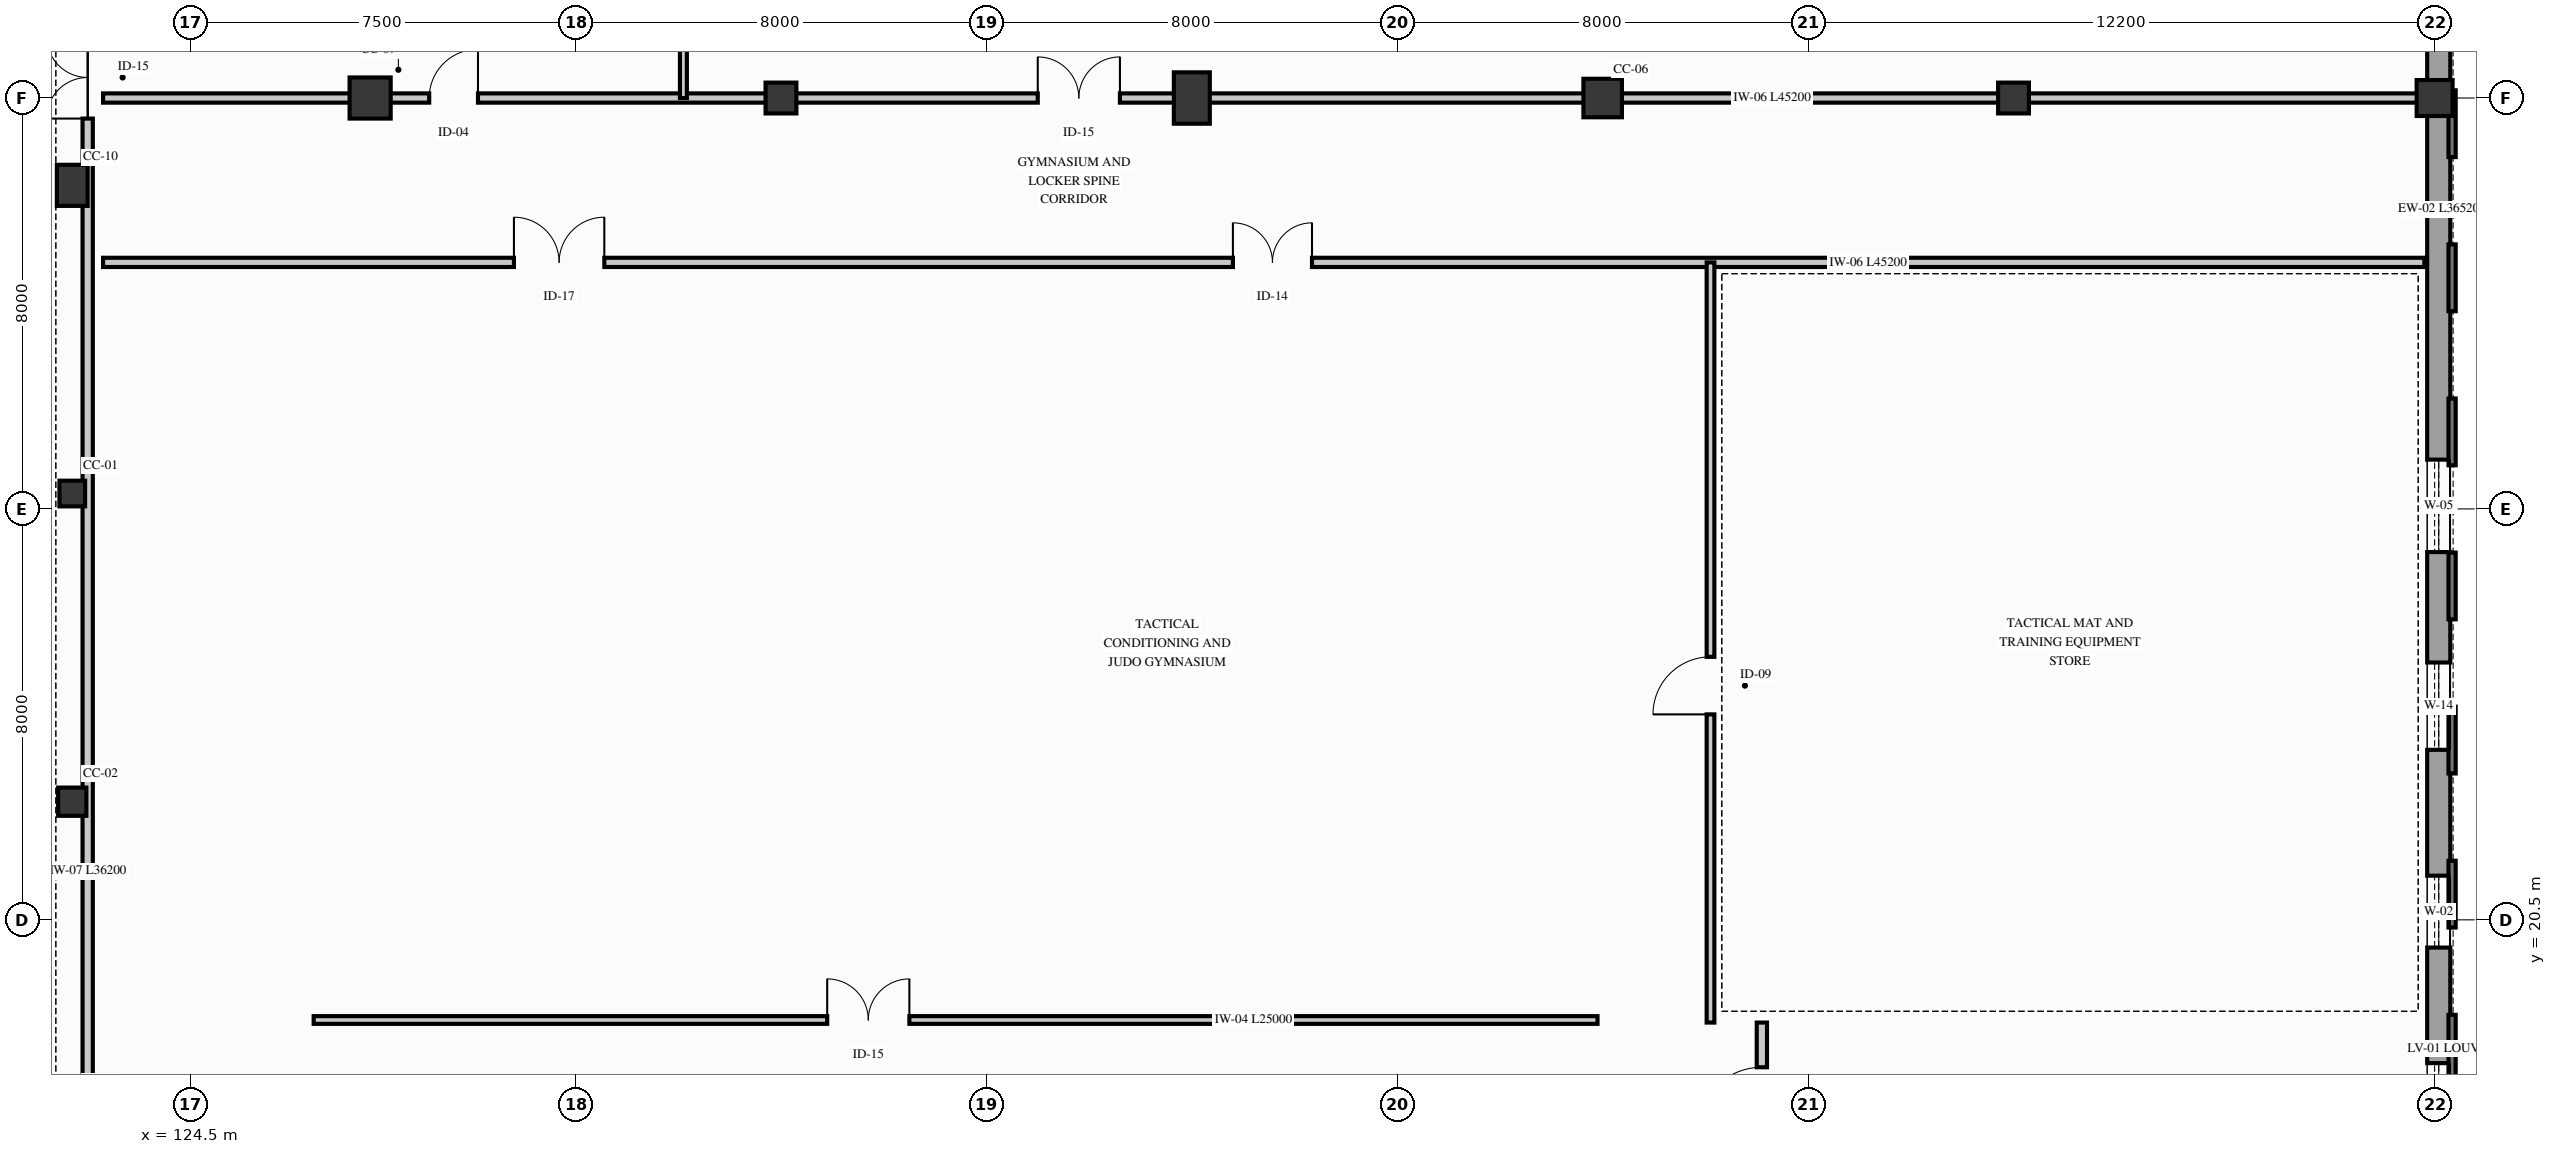
"""IFC4 building model, lengths in metres.
Left out: names, types, materials, properties, quantities, classifications, styles, units other than length and angle.
Written with IfcOpenShell. Run it as: python <this file> out.ifc"""

import sys

from ifc_helpers import new_model, si_unit, direction, frame, frame_2d, origin, origin_2d, place, context, subcontext, project, spatial, rectangle, circle, extrude, element, fill, save


model = new_model("IFC4")
c1 = context("Model", 3, precision=1e-05, world=origin(), true_north=direction((0.0, 1.0)))
c2 = subcontext(c1, "Body", "Model", "MODEL_VIEW")
j1 = project(units=[si_unit("LENGTHUNIT", "METRE"), si_unit("PLANEANGLEUNIT", "RADIAN")], contexts=[c1])
p1 = place(None, origin())
s1 = spatial("IfcSite", under=j1, at=p1, CompositionType="ELEMENT")
p2 = place(p1, origin())
s2 = spatial("IfcBuilding", under=s1, at=p2, CompositionType="ELEMENT")
p3 = place(p2, origin())
s3 = spatial("IfcBuildingStorey", under=s2, at=p3, CompositionType="ELEMENT", Elevation=0.0)
p4 = place(p3, frame((122.2, 22.8, 0.0), z_axis=(0.0, 0.0, 1.0), x_axis=(1.0, 0.0, 0.0)))
e1 = element("IfcColumn", 1, at=p4, inside=s3, PredefinedType="COLUMN", context=c2, shape_type="SweptSolid", body=[
    extrude(rectangle(XDim=0.55, YDim=0.55, at=origin_2d()), origin(), (0.0, 0.0, 1.0), 5.1),
])
p5 = place(p3, frame((122.2, 28.8, 0.0), z_axis=(0.0, 0.0, 1.0), x_axis=(1.0, 0.0, 0.0)))
e2 = element("IfcColumn", 2, at=p5, inside=s3, PredefinedType="COLUMN", context=c2, shape_type="SweptSolid", body=[
    extrude(rectangle(XDim=0.5, YDim=0.5, at=origin_2d()), origin(), (0.0, 0.0, 1.0), 5.1),
])
p6 = place(p3, frame((122.2, 34.8, 0.0), z_axis=(0.0, 0.0, 1.0), x_axis=(1.0, 0.0, 0.0)))
e3 = element("IfcColumn", 3, at=p6, inside=s3, PredefinedType="COLUMN", context=c2, shape_type="SweptSolid", body=[
    extrude(rectangle(XDim=0.6, YDim=0.8, at=origin_2d()), origin(), (0.0, 0.0, 1.0), 5.1),
])
p7 = place(p3, frame((128.0, 36.5, 0.0), z_axis=(0.0, 0.0, 1.0), x_axis=(1.0, 0.0, 0.0)))
e4 = element("IfcColumn", 4, at=p7, inside=s3, PredefinedType="COLUMN", context=c2, shape_type="SweptSolid", body=[
    extrude(rectangle(XDim=0.8, YDim=0.8, at=origin_2d()), origin(), (0.0, 0.0, 1.0), 5.1),
])
p8 = place(p3, frame((136.0, 36.5, 0.0), z_axis=(0.0, 0.0, 1.0), x_axis=(1.0, 0.0, 0.0)))
e5 = element("IfcColumn", 5, at=p8, inside=s3, PredefinedType="COLUMN", context=c2, shape_type="SweptSolid", body=[
    extrude(rectangle(XDim=0.6, YDim=0.6, at=origin_2d()), origin(), (0.0, 0.0, 1.0), 5.1),
])
p9 = place(p3, frame((144.0, 36.5, 0.0), z_axis=(0.0, 0.0, 1.0), x_axis=(1.0, 0.0, 0.0)))
e6 = element("IfcColumn", 6, at=p9, inside=s3, PredefinedType="COLUMN", context=c2, shape_type="SweptSolid", body=[
    extrude(rectangle(XDim=0.7, YDim=1.0, at=origin_2d()), origin(), (0.0, 0.0, 1.0), 5.1),
])
p10 = place(p3, frame((152.0, 36.5, 0.0), z_axis=(0.0, 0.0, 1.0), x_axis=(1.0, 0.0, 0.0)))
e7 = element("IfcColumn", 7, at=p10, inside=s3, PredefinedType="COLUMN", context=c2, shape_type="SweptSolid", body=[
    extrude(rectangle(XDim=0.75, YDim=0.75, at=origin_2d()), origin(), (0.0, 0.0, 1.0), 5.1),
])
p11 = place(p3, frame((160.0, 36.5, 0.0), z_axis=(0.0, 0.0, 1.0), x_axis=(1.0, 0.0, 0.0)))
e8 = element("IfcColumn", 8, at=p11, inside=s3, PredefinedType="COLUMN", context=c2, shape_type="SweptSolid", body=[
    extrude(rectangle(XDim=0.6, YDim=0.6, at=origin_2d()), origin(), (0.0, 0.0, 1.0), 5.1),
])
p12 = place(p3, frame((168.2, 36.5, 0.0), z_axis=(0.0, 0.0, 1.0), x_axis=(1.0, 0.0, 0.0)))
e9 = element("IfcColumn", 9, at=p12, inside=s3, PredefinedType="COLUMN", context=c2, shape_type="SweptSolid", body=[
    extrude(circle(Radius=0.35, at=origin_2d()), origin(), (0.0, 0.0, 1.0), 5.1),
])
p13 = place(p3, frame((168.28, 6.76, 0.0), z_axis=(0.0, 0.0, 1.0), x_axis=(0.0, 1.0, 0.0)))
e10 = element("IfcWall", 10, at=p13, inside=s3, PredefinedType="SOLIDWALL", context=c2, shape_type="SweptSolid", body=[
    extrude(rectangle(XDim=36.52, YDim=0.45, at=frame_2d((18.26, 0.0))), origin(), (0.0, 0.0, 1.0), 4.56),
])
p14 = place(p13, frame((1.65, 0.0, 0.85)))
e11 = element("IfcOpeningElement", 11, at=p14, cuts=e10, PredefinedType="OPENING", context=c2, shape_type="SweptSolid", body=[
    extrude(rectangle(XDim=1.3, YDim=2.15, at=frame_2d((0.65, 1.075))), frame((0.0, 0.235, 0.0), z_axis=(0.0, -1.0, 0.0), x_axis=(1.0, 0.0, 0.0)), (0.0, 0.0, 1.0), 0.47),
])
p15 = place(p13, frame((5.5, 0.0, 0.85)))
e12 = element("IfcOpeningElement", 12, at=p15, cuts=e10, PredefinedType="OPENING", context=c2, shape_type="SweptSolid", body=[
    extrude(rectangle(XDim=1.5, YDim=2.3, at=frame_2d((0.75, 1.15))), frame((0.0, 0.235, 0.0), z_axis=(0.0, -1.0, 0.0), x_axis=(1.0, 0.0, 0.0)), (0.0, 0.0, 1.0), 0.47),
])
p16 = place(p13, frame((9.35, 0.0, 0.85)))
e13 = element("IfcOpeningElement", 13, at=p16, cuts=e10, PredefinedType="OPENING", context=c2, shape_type="SweptSolid", body=[
    extrude(rectangle(XDim=1.6, YDim=2.4, at=frame_2d((0.8, 1.2))), frame((0.0, 0.235, 0.0), z_axis=(0.0, -1.0, 0.0), x_axis=(1.0, 0.0, 0.0)), (0.0, 0.0, 1.0), 0.47),
])
p17 = place(p13, frame((13.2, 0.0, 0.85)))
e14 = element("IfcOpeningElement", 14, at=p17, cuts=e10, PredefinedType="OPENING", context=c2, shape_type="SweptSolid", body=[
    extrude(rectangle(XDim=1.4, YDim=2.2, at=frame_2d((0.7, 1.1))), frame((0.0, 0.235, 0.0), z_axis=(0.0, -1.0, 0.0), x_axis=(1.0, 0.0, 0.0)), (0.0, 0.0, 1.0), 0.47),
])
p18 = place(p13, frame((17.05, 0.0, 0.85)))
e15 = element("IfcOpeningElement", 15, at=p18, cuts=e10, PredefinedType="OPENING", context=c2, shape_type="SweptSolid", body=[
    extrude(rectangle(XDim=1.7, YDim=2.35, at=frame_2d((0.85, 1.175))), frame((0.0, 0.235, 0.0), z_axis=(0.0, -1.0, 0.0), x_axis=(1.0, 0.0, 0.0)), (0.0, 0.0, 1.0), 0.47),
])
p19 = place(p13, frame((20.9, 0.0, 0.85)))
e16 = element("IfcOpeningElement", 16, at=p19, cuts=e10, PredefinedType="OPENING", context=c2, shape_type="SweptSolid", body=[
    extrude(rectangle(XDim=1.8, YDim=2.4, at=frame_2d((0.9, 1.2))), frame((0.0, 0.235, 0.0), z_axis=(0.0, -1.0, 0.0), x_axis=(1.0, 0.0, 0.0)), (0.0, 0.0, 1.0), 0.47),
])
p20 = place(p13, frame((32.45, 0.0, 0.85)))
e17 = element("IfcOpeningElement", 17, at=p20, cuts=e10, PredefinedType="OPENING", context=c2, shape_type="SweptSolid", body=[
    extrude(rectangle(XDim=2.0, YDim=2.5, at=frame_2d((1.0, 1.25))), frame((0.0, 0.235, 0.0), z_axis=(0.0, -1.0, 0.0), x_axis=(1.0, 0.0, 0.0)), (0.0, 0.0, 1.0), 0.47),
])
p21 = place(p3, frame((155.1, 6.78, 0.0), z_axis=(0.0, 0.0, 1.0), x_axis=(0.0, 1.0, 0.0)))
e18 = element("IfcWall", 18, at=p21, inside=s3, PredefinedType="PARTITIONING", context=c2, shape_type="SweptSolid", body=[
    extrude(rectangle(XDim=11.72, YDim=0.2, at=frame_2d((5.86, 0.0))), origin(), (0.0, 0.0, 1.0), 4.368),
])
p22 = place(p21, frame((9.6, 0.0, 0.0)))
e19 = element("IfcOpeningElement", 19, at=p22, cuts=e18, PredefinedType="OPENING", context=c2, shape_type="SweptSolid", body=[
    extrude(rectangle(XDim=1.25, YDim=2.2, at=frame_2d((0.625, 1.1))), frame((0.0, 0.11, 0.0), z_axis=(0.0, -1.0, 0.0), x_axis=(1.0, 0.0, 0.0)), (0.0, 0.0, 1.0), 0.22),
])
p23 = place(p3, frame((122.5, 6.8, 0.0), z_axis=(0.0, 0.0, 1.0), x_axis=(0.0, 1.0, 0.0)))
e20 = element("IfcWall", 20, at=p23, inside=s3, PredefinedType="PARTITIONING", context=c2, shape_type="SweptSolid", body=[
    extrude(rectangle(XDim=36.2, YDim=0.2, at=frame_2d((18.1, 0.0))), origin(), (0.0, 0.0, 1.0), 4.86),
])
p24 = place(p23, frame((29.3, 0.0, 0.0)))
e21 = element("IfcOpeningElement", 21, at=p24, cuts=e20, PredefinedType="OPENING", context=c2, shape_type="SweptSolid", body=[
    extrude(rectangle(XDim=1.6, YDim=2.3, at=frame_2d((0.8, 1.15))), frame((0.0, 0.11, 0.0), z_axis=(0.0, -1.0, 0.0), x_axis=(1.0, 0.0, 0.0)), (0.0, 0.0, 1.0), 0.22),
])
p25 = place(p3, frame((122.8, 33.3, 0.0), z_axis=(0.0, 0.0, 1.0), x_axis=(1.0, 0.0, 0.0)))
e22 = element("IfcWall", 22, at=p25, inside=s3, PredefinedType="PARTITIONING", context=c2, shape_type="SweptSolid", body=[
    extrude(rectangle(XDim=45.2, YDim=0.18, at=frame_2d((22.6, 0.0))), origin(), (0.0, 0.0, 1.0), 4.328),
])
p26 = place(p25, frame((8.0, 0.0, 0.0)))
e23 = element("IfcOpeningElement", 23, at=p26, cuts=e22, PredefinedType="OPENING", context=c2, shape_type="SweptSolid", body=[
    extrude(rectangle(XDim=1.76, YDim=2.36, at=frame_2d((0.88, 1.18))), frame((0.0, 0.1, 0.0), z_axis=(0.0, -1.0, 0.0), x_axis=(1.0, 0.0, 0.0)), (0.0, 0.0, 1.0), 0.2),
])
p27 = place(p25, frame((22.0, 0.0, 0.0)))
e24 = element("IfcOpeningElement", 24, at=p27, cuts=e22, PredefinedType="OPENING", context=c2, shape_type="SweptSolid", body=[
    extrude(rectangle(XDim=1.54, YDim=2.3, at=frame_2d((0.77, 1.15))), frame((0.0, 0.1, 0.0), z_axis=(0.0, -1.0, 0.0), x_axis=(1.0, 0.0, 0.0)), (0.0, 0.0, 1.0), 0.2),
])
p28 = place(p3, frame((122.8, 36.5, 0.0), z_axis=(0.0, 0.0, 1.0), x_axis=(1.0, 0.0, 0.0)))
e25 = element("IfcWall", 25, at=p28, inside=s3, PredefinedType="PARTITIONING", context=c2, shape_type="SweptSolid", body=[
    extrude(rectangle(XDim=45.2, YDim=0.18, at=frame_2d((22.6, 0.0))), origin(), (0.0, 0.0, 1.0), 4.37),
])
p29 = place(p28, frame((6.35, 0.0, 0.0)))
e26 = element("IfcOpeningElement", 26, at=p29, cuts=e25, PredefinedType="OPENING", context=c2, shape_type="SweptSolid", body=[
    extrude(rectangle(XDim=0.95, YDim=2.15, at=frame_2d((0.475, 1.075))), frame((0.0, 0.1, 0.0), z_axis=(0.0, -1.0, 0.0), x_axis=(1.0, 0.0, 0.0)), (0.0, 0.0, 1.0), 0.2),
])
p30 = place(p28, frame((18.2, 0.0, 0.0)))
e27 = element("IfcOpeningElement", 27, at=p30, cuts=e25, PredefinedType="OPENING", context=c2, shape_type="SweptSolid", body=[
    extrude(rectangle(XDim=1.6, YDim=2.3, at=frame_2d((0.8, 1.15))), frame((0.0, 0.1, 0.0), z_axis=(0.0, -1.0, 0.0), x_axis=(1.0, 0.0, 0.0)), (0.0, 0.0, 1.0), 0.2),
])
p31 = place(p3, frame((126.9, 18.55, 0.0), z_axis=(0.0, 0.0, 1.0), x_axis=(1.0, 0.0, 0.0)))
e28 = element("IfcWall", 28, at=p31, inside=s3, PredefinedType="PARTITIONING", context=c2, shape_type="SweptSolid", body=[
    extrude(rectangle(XDim=25.0, YDim=0.15, at=frame_2d((12.5, 0.0))), origin(), (0.0, 0.0, 1.0), 4.86),
])
p32 = place(p31, frame((10.0, 0.0, 0.0)))
e29 = element("IfcOpeningElement", 29, at=p32, cuts=e28, PredefinedType="OPENING", context=c2, shape_type="SweptSolid", body=[
    extrude(rectangle(XDim=1.6, YDim=2.3, at=frame_2d((0.8, 1.15))), frame((0.0, 0.085, 0.0), z_axis=(0.0, -1.0, 0.0), x_axis=(1.0, 0.0, 0.0)), (0.0, 0.0, 1.0), 0.17),
])
p33 = place(p3, frame((134.1, 36.5, 0.0), z_axis=(0.0, 0.0, 1.0), x_axis=(0.0, 1.0, 0.0)))
e30 = element("IfcWall", 30, at=p33, inside=s3, PredefinedType="PARTITIONING", context=c2, shape_type="SweptSolid", body=[
    extrude(rectangle(XDim=6.5, YDim=0.135, at=frame_2d((3.25, 0.0))), origin(), (0.0, 0.0, 1.0), 4.86),
])
p34 = place(p3, frame((154.1, 18.5, 0.0), z_axis=(0.0, 0.0, 1.0), x_axis=(0.0, 1.0, 0.0)))
e31 = element("IfcWall", 31, at=p34, inside=s3, PredefinedType="PARTITIONING", context=c2, shape_type="SweptSolid", body=[
    extrude(rectangle(XDim=14.8, YDim=0.15, at=frame_2d((7.4, 0.0))), origin(), (0.0, 0.0, 1.0), 4.86),
])
p35 = place(p34, frame((6.0, 0.0, 0.0)))
e32 = element("IfcOpeningElement", 32, at=p35, cuts=e31, PredefinedType="OPENING", context=c2, shape_type="SweptSolid", body=[
    extrude(rectangle(XDim=1.12, YDim=2.2, at=frame_2d((0.56, 1.1))), frame((0.0, 0.085, 0.0), z_axis=(0.0, -1.0, 0.0), x_axis=(1.0, 0.0, 0.0)), (0.0, 0.0, 1.0), 0.17),
])
p36 = place(p16, origin())
e33 = element("IfcWindow", 33, at=p36, inside=s3, PartitioningType="SINGLE_PANEL", PredefinedType="WINDOW", context=c2, shape_type="SweptSolid", body=[
    extrude(rectangle(XDim=1.6, YDim=2.4, at=frame_2d((0.8, 1.2))), frame((0.0, 0.03, 0.0), z_axis=(0.0, -1.0, 0.0), x_axis=(1.0, 0.0, 0.0)), (0.0, 0.0, 1.0), 0.06),
])
fill(e13, e33)
p37 = place(p17, origin())
e34 = element("IfcWindow", 34, at=p37, inside=s3, PartitioningType="SINGLE_PANEL", PredefinedType="WINDOW", context=c2, shape_type="SweptSolid", body=[
    extrude(rectangle(XDim=1.4, YDim=2.2, at=frame_2d((0.7, 1.1))), frame((0.0, 0.03, 0.0), z_axis=(0.0, -1.0, 0.0), x_axis=(1.0, 0.0, 0.0)), (0.0, 0.0, 1.0), 0.06),
])
fill(e14, e34)
p38 = place(p18, origin())
e35 = element("IfcWindow", 35, at=p38, inside=s3, PartitioningType="SINGLE_PANEL", PredefinedType="WINDOW", context=c2, shape_type="SweptSolid", body=[
    extrude(rectangle(XDim=1.7, YDim=2.35, at=frame_2d((0.85, 1.175))), frame((0.0, 0.03, 0.0), z_axis=(0.0, -1.0, 0.0), x_axis=(1.0, 0.0, 0.0)), (0.0, 0.0, 1.0), 0.06),
])
fill(e15, e35)
p39 = place(p19, origin())
e36 = element("IfcWindow", 36, at=p39, inside=s3, PartitioningType="SINGLE_PANEL", PredefinedType="WINDOW", context=c2, shape_type="SweptSolid", body=[
    extrude(rectangle(XDim=1.8, YDim=2.4, at=frame_2d((0.9, 1.2))), frame((0.0, 0.03, 0.0), z_axis=(0.0, -1.0, 0.0), x_axis=(1.0, 0.0, 0.0)), (0.0, 0.0, 1.0), 0.06),
])
fill(e16, e36)
p40 = place(p22, origin())
e37 = element("IfcDoor", 37, at=p40, inside=s3, OperationType="SINGLE_SWING_LEFT", PredefinedType="DOOR", context=c2, shape_type="SweptSolid", body=[
    extrude(rectangle(XDim=1.25, YDim=2.2, at=frame_2d((0.625, 1.1))), frame((0.0, 0.025, 0.0), z_axis=(0.0, -1.0, 0.0), x_axis=(1.0, 0.0, 0.0)), (0.0, 0.0, 1.0), 0.05),
])
fill(e19, e37)
p41 = place(p24, origin())
e38 = element("IfcDoor", 38, at=p41, inside=s3, OperationType="DOUBLE_DOOR_SINGLE_SWING", PredefinedType="DOOR", context=c2, shape_type="SweptSolid", body=[
    extrude(rectangle(XDim=1.6, YDim=2.3, at=frame_2d((0.8, 1.15))), frame((0.0, 0.025, 0.0), z_axis=(0.0, -1.0, 0.0), x_axis=(1.0, 0.0, 0.0)), (0.0, 0.0, 1.0), 0.05),
])
fill(e21, e38)
p42 = place(p26, origin())
e39 = element("IfcDoor", 39, at=p42, inside=s3, OperationType="DOUBLE_DOOR_SINGLE_SWING", PredefinedType="DOOR", context=c2, shape_type="SweptSolid", body=[
    extrude(rectangle(XDim=1.76, YDim=2.36, at=frame_2d((0.88, 1.18))), frame((0.0, 0.025, 0.0), z_axis=(0.0, -1.0, 0.0), x_axis=(1.0, 0.0, 0.0)), (0.0, 0.0, 1.0), 0.05),
])
fill(e23, e39)
p43 = place(p27, origin())
e40 = element("IfcDoor", 40, at=p43, inside=s3, OperationType="DOUBLE_DOOR_SINGLE_SWING", PredefinedType="DOOR", context=c2, shape_type="SweptSolid", body=[
    extrude(rectangle(XDim=1.54, YDim=2.3, at=frame_2d((0.77, 1.15))), frame((0.0, 0.025, 0.0), z_axis=(0.0, -1.0, 0.0), x_axis=(1.0, 0.0, 0.0)), (0.0, 0.0, 1.0), 0.05),
])
fill(e24, e40)
p44 = place(p29, origin())
e41 = element("IfcDoor", 41, at=p44, inside=s3, OperationType="SINGLE_SWING_RIGHT", PredefinedType="DOOR", context=c2, shape_type="SweptSolid", body=[
    extrude(rectangle(XDim=0.95, YDim=2.15, at=frame_2d((0.475, 1.075))), frame((0.0, 0.025, 0.0), z_axis=(0.0, -1.0, 0.0), x_axis=(1.0, 0.0, 0.0)), (0.0, 0.0, 1.0), 0.05),
])
fill(e26, e41)
p45 = place(p30, origin())
e42 = element("IfcDoor", 42, at=p45, inside=s3, OperationType="DOUBLE_DOOR_SINGLE_SWING", PredefinedType="DOOR", context=c2, shape_type="SweptSolid", body=[
    extrude(rectangle(XDim=1.6, YDim=2.3, at=frame_2d((0.8, 1.15))), frame((0.0, 0.025, 0.0), z_axis=(0.0, -1.0, 0.0), x_axis=(1.0, 0.0, 0.0)), (0.0, 0.0, 1.0), 0.05),
])
fill(e27, e42)
p46 = place(p32, origin())
e43 = element("IfcDoor", 43, at=p46, inside=s3, OperationType="DOUBLE_DOOR_SINGLE_SWING", PredefinedType="DOOR", context=c2, shape_type="SweptSolid", body=[
    extrude(rectangle(XDim=1.6, YDim=2.3, at=frame_2d((0.8, 1.15))), frame((0.0, 0.025, 0.0), z_axis=(0.0, -1.0, 0.0), x_axis=(1.0, 0.0, 0.0)), (0.0, 0.0, 1.0), 0.05),
])
fill(e29, e43)
p47 = place(p35, origin())
e44 = element("IfcDoor", 44, at=p47, inside=s3, OperationType="SINGLE_SWING_LEFT", PredefinedType="DOOR", context=c2, shape_type="SweptSolid", body=[
    extrude(rectangle(XDim=1.12, YDim=2.2, at=frame_2d((0.56, 1.1))), frame((0.0, 0.025, 0.0), z_axis=(0.0, -1.0, 0.0), x_axis=(1.0, 0.0, 0.0)), (0.0, 0.0, 1.0), 0.05),
])
fill(e32, e44)
save(model, sys.argv[1])
